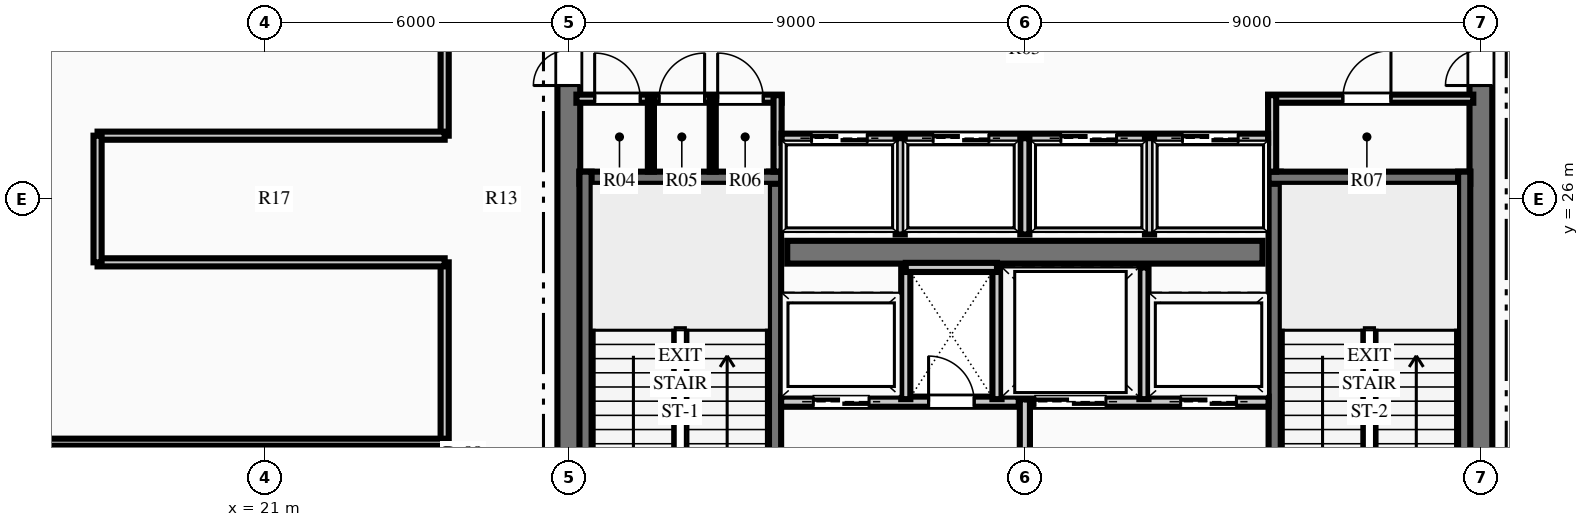
"""IFC4 building model, lengths in metres.
Left out: names, types, materials, properties, quantities, classifications, styles, units other than length and angle.
Written with IfcOpenShell. Run it as: python <this file> out.ifc"""

import sys

from ifc_helpers import new_model, si_unit, direction, frame, frame_2d, origin, place, context, subcontext, project, spatial, rectangle, extrude, element, fill, save


model = new_model("IFC4")
c1 = context("Model", 3, precision=1e-05, world=origin(), true_north=direction((0.0, 1.0)))
c2 = subcontext(c1, "Body", "Model", "MODEL_VIEW")
j1 = project(units=[si_unit("LENGTHUNIT", "METRE"), si_unit("PLANEANGLEUNIT", "RADIAN")], contexts=[c1])
p1 = place(None, origin())
s1 = spatial("IfcSite", under=j1, at=p1, CompositionType="ELEMENT")
p2 = place(p1, origin())
s2 = spatial("IfcBuilding", under=s1, at=p2, CompositionType="ELEMENT")
p3 = place(p2, frame((0.0, 0.0, 347.7)))
s3 = spatial("IfcBuildingStorey", under=s2, at=p3, CompositionType="ELEMENT", Elevation=347.7)
p4 = place(p3, frame((27.0, 18.225, 0.0), z_axis=(0.0, 0.0, 1.0), x_axis=(0.0, 1.0, 0.0)))
e1 = element("IfcWall", 1, at=p4, inside=s3, PredefinedType="SHEAR", context=c2, shape_type="SweptSolid", body=[
    extrude(rectangle(XDim=15.55, YDim=0.45, at=frame_2d((7.775, 0.0))), origin(), (0.0, 0.0, 1.0), 4.5),
])
p5 = place(p4, frame((10.015, 0.0, 0.0)))
e2 = element("IfcOpeningElement", 2, at=p5, cuts=e1, PredefinedType="OPENING", context=c2, shape_type="SweptSolid", body=[
    extrude(rectangle(XDim=1.4, YDim=2.2, at=frame_2d((0.7, 1.1))), frame((0.0, 0.235, 0.0), z_axis=(0.0, -1.0, 0.0), x_axis=(1.0, 0.0, 0.0)), (0.0, 0.0, 1.0), 0.47),
])
p6 = place(p3, frame((45.0, 18.225, 0.0), z_axis=(0.0, 0.0, 1.0), x_axis=(0.0, 1.0, 0.0)))
e3 = element("IfcWall", 3, at=p6, inside=s3, PredefinedType="SHEAR", context=c2, shape_type="SweptSolid", body=[
    extrude(rectangle(XDim=15.55, YDim=0.45, at=frame_2d((7.775, 0.0))), origin(), (0.0, 0.0, 1.0), 4.5),
])
p7 = place(p6, frame((10.015, 0.0, 0.0)))
e4 = element("IfcOpeningElement", 4, at=p7, cuts=e3, PredefinedType="OPENING", context=c2, shape_type="SweptSolid", body=[
    extrude(rectangle(XDim=1.4, YDim=2.2, at=frame_2d((0.7, 1.1))), frame((0.0, 0.235, 0.0), z_axis=(0.0, -1.0, 0.0), x_axis=(1.0, 0.0, 0.0)), (0.0, 0.0, 1.0), 0.47),
])
p8 = place(p3, frame((31.31, 24.95, 0.0), z_axis=(0.0, 0.0, 1.0), x_axis=(1.0, 0.0, 0.0)))
e5 = element("IfcWall", 5, at=p8, inside=s3, PredefinedType="SHEAR", context=c2, shape_type="SweptSolid", body=[
    extrude(rectangle(XDim=9.38, YDim=0.45, at=frame_2d((4.69, 0.0))), origin(), (0.0, 0.0, 1.0), 4.5),
])
p9 = place(p3, frame((31.07, 18.28, 0.0), z_axis=(0.0, 0.0, 1.0), x_axis=(0.0, 1.0, 0.0)))
e6 = element("IfcWall", 6, at=p9, inside=s3, PredefinedType="SHEAR", context=c2, shape_type="SweptSolid", body=[
    extrude(rectangle(XDim=8.26, YDim=0.24, at=frame_2d((4.13, 0.0))), origin(), (0.0, 0.0, 1.0), 4.5),
])
p10 = place(p9, frame((0.365, 0.0, 0.0)))
e7 = element("IfcOpeningElement", 7, at=p10, cuts=e6, PredefinedType="OPENING", context=c2, shape_type="SweptSolid", body=[
    extrude(rectangle(XDim=1.05, YDim=2.15, at=frame_2d((0.525, 1.075))), frame((0.0, 0.13, 0.0), z_axis=(0.0, -1.0, 0.0), x_axis=(1.0, 0.0, 0.0)), (0.0, 0.0, 1.0), 0.26),
])
p11 = place(p3, frame((27.21, 26.42, 0.0), z_axis=(0.0, 0.0, 1.0), x_axis=(1.0, 0.0, 0.0)))
e8 = element("IfcWall", 8, at=p11, inside=s3, PredefinedType="SHEAR", context=c2, shape_type="SweptSolid", body=[
    extrude(rectangle(XDim=3.98, YDim=0.24, at=frame_2d((1.99, 0.0))), origin(), (0.0, 0.0, 1.0), 4.5),
])
p12 = place(p3, frame((27.33, 18.28, 0.0), z_axis=(0.0, 0.0, 1.0), x_axis=(0.0, 1.0, 0.0)))
e9 = element("IfcWall", 9, at=p12, inside=s3, PredefinedType="SHEAR", context=c2, shape_type="SweptSolid", body=[
    extrude(rectangle(XDim=8.26, YDim=0.24, at=frame_2d((4.13, 0.0))), origin(), (0.0, 0.0, 1.0), 4.5),
])
p13 = place(p3, frame((40.93, 18.28, 0.0), z_axis=(0.0, 0.0, 1.0), x_axis=(0.0, 1.0, 0.0)))
e10 = element("IfcWall", 10, at=p13, inside=s3, PredefinedType="SHEAR", context=c2, shape_type="SweptSolid", body=[
    extrude(rectangle(XDim=8.26, YDim=0.24, at=frame_2d((4.13, 0.0))), origin(), (0.0, 0.0, 1.0), 4.5),
])
p14 = place(p13, frame((0.365, 0.0, 0.0)))
e11 = element("IfcOpeningElement", 11, at=p14, cuts=e10, PredefinedType="OPENING", context=c2, shape_type="SweptSolid", body=[
    extrude(rectangle(XDim=1.05, YDim=2.15, at=frame_2d((0.525, 1.075))), frame((0.0, 0.13, 0.0), z_axis=(0.0, -1.0, 0.0), x_axis=(1.0, 0.0, 0.0)), (0.0, 0.0, 1.0), 0.26),
])
p15 = place(p3, frame((40.81, 26.42, 0.0), z_axis=(0.0, 0.0, 1.0), x_axis=(1.0, 0.0, 0.0)))
e12 = element("IfcWall", 12, at=p15, inside=s3, PredefinedType="SHEAR", context=c2, shape_type="SweptSolid", body=[
    extrude(rectangle(XDim=3.98, YDim=0.24, at=frame_2d((1.99, 0.0))), origin(), (0.0, 0.0, 1.0), 4.5),
])
p16 = place(p3, frame((44.67, 18.28, 0.0), z_axis=(0.0, 0.0, 1.0), x_axis=(0.0, 1.0, 0.0)))
e13 = element("IfcWall", 13, at=p16, inside=s3, PredefinedType="SHEAR", context=c2, shape_type="SweptSolid", body=[
    extrude(rectangle(XDim=8.26, YDim=0.24, at=frame_2d((4.13, 0.0))), origin(), (0.0, 0.0, 1.0), 4.5),
])
p17 = place(p3, frame((36.0, 18.28, 0.0), z_axis=(0.0, 0.0, 1.0), x_axis=(0.0, 1.0, 0.0)))
e14 = element("IfcWall", 14, at=p17, inside=s3, PredefinedType="PARTITIONING", context=c2, shape_type="SweptSolid", body=[
    extrude(rectangle(XDim=3.77, YDim=0.2, at=frame_2d((1.885, 0.0))), origin(), (0.0, 0.0, 1.0), 4.1),
])
p18 = place(p3, frame((31.19, 22.0, 0.0), z_axis=(0.0, 0.0, 1.0), x_axis=(1.0, 0.0, 0.0)))
e15 = element("IfcWall", 15, at=p18, inside=s3, PredefinedType="PARTITIONING", context=c2, shape_type="SweptSolid", body=[
    extrude(rectangle(XDim=4.69, YDim=0.2, at=frame_2d((2.345, 0.0))), origin(), (0.0, 0.0, 1.0), 4.1),
])
p19 = place(p18, frame((2.91, 0.0, 0.0)))
e16 = element("IfcOpeningElement", 16, at=p19, cuts=e15, PredefinedType="OPENING", context=c2, shape_type="SweptSolid", body=[
    extrude(rectangle(XDim=0.9, YDim=2.15, at=frame_2d((0.45, 1.075))), frame((0.0, 0.11, 0.0), z_axis=(0.0, -1.0, 0.0), x_axis=(1.0, 0.0, 0.0)), (0.0, 0.0, 1.0), 0.22),
])
p20 = place(p18, frame((0.635, 0.0, 0.0)))
e17 = element("IfcOpeningElement", 17, at=p20, cuts=e15, PredefinedType="OPENING", context=c2, shape_type="SweptSolid", body=[
    extrude(rectangle(XDim=1.1, YDim=2.15, at=frame_2d((0.55, 1.075))), frame((0.0, 0.11, 0.0), z_axis=(0.0, -1.0, 0.0), x_axis=(1.0, 0.0, 0.0)), (0.0, 0.0, 1.0), 0.22),
])
p21 = place(p3, frame((36.12, 22.0, 0.0), z_axis=(0.0, 0.0, 1.0), x_axis=(1.0, 0.0, 0.0)))
e18 = element("IfcWall", 18, at=p21, inside=s3, PredefinedType="PARTITIONING", context=c2, shape_type="SweptSolid", body=[
    extrude(rectangle(XDim=4.69, YDim=0.2, at=frame_2d((2.345, 0.0))), origin(), (0.0, 0.0, 1.0), 4.1),
])
p22 = place(p21, frame((2.955, 0.0, 0.0)))
e19 = element("IfcOpeningElement", 19, at=p22, cuts=e18, PredefinedType="OPENING", context=c2, shape_type="SweptSolid", body=[
    extrude(rectangle(XDim=1.1, YDim=2.15, at=frame_2d((0.55, 1.075))), frame((0.0, 0.11, 0.0), z_axis=(0.0, -1.0, 0.0), x_axis=(1.0, 0.0, 0.0)), (0.0, 0.0, 1.0), 0.22),
])
p23 = place(p21, frame((0.08, 0.0, 0.0)))
e20 = element("IfcOpeningElement", 20, at=p23, cuts=e18, PredefinedType="OPENING", context=c2, shape_type="SweptSolid", body=[
    extrude(rectangle(XDim=1.4, YDim=2.2, at=frame_2d((0.7, 1.1))), frame((0.0, 0.11, 0.0), z_axis=(0.0, -1.0, 0.0), x_axis=(1.0, 0.0, 0.0)), (0.0, 0.0, 1.0), 0.22),
])
for number, where, z_axis, x_axis in (
    (21, (33.65, 22.05, 0.0), (0.0, 0.0, 1.0), (0.0, 1.0, 0.0)),
    (22, (35.45, 22.05, 0.0), (0.0, 0.0, 1.0), (0.0, 1.0, 0.0)),
):
    element("IfcWall", number, at=place(p3, frame(where, z_axis=z_axis, x_axis=x_axis)), inside=s3, PredefinedType="PARTITIONING", context=c2, shape_type="SweptSolid", body=[
        extrude(rectangle(XDim=2.6, YDim=0.18, at=frame_2d((1.3, 0.0))), origin(), (0.0, 0.0, 1.0), 4.1),
    ])
p24 = place(p3, frame((33.65, 24.65, 0.0), z_axis=(0.0, 0.0, 1.0), x_axis=(1.0, 0.0, 0.0)))
e23 = element("IfcWall", 23, at=p24, inside=s3, PredefinedType="PARTITIONING", context=c2, shape_type="SweptSolid", body=[
    extrude(rectangle(XDim=1.8, YDim=0.18, at=frame_2d((0.9, 0.0))), origin(), (0.0, 0.0, 1.0), 4.1),
])
p25 = place(p3, frame((38.35, 22.05, 0.0), z_axis=(0.0, 0.0, 1.0), x_axis=(0.0, 1.0, 0.0)))
e24 = element("IfcWall", 24, at=p25, inside=s3, PredefinedType="PARTITIONING", context=c2, shape_type="SweptSolid", body=[
    extrude(rectangle(XDim=2.6, YDim=0.18, at=frame_2d((1.3, 0.0))), origin(), (0.0, 0.0, 1.0), 4.1),
])
p26 = place(p3, frame((27.15, 27.98, 0.0), z_axis=(0.0, 0.0, 1.0), x_axis=(1.0, 0.0, 0.0)))
e25 = element("IfcWall", 25, at=p26, inside=s3, PredefinedType="PARTITIONING", context=c2, shape_type="SweptSolid", body=[
    extrude(rectangle(XDim=4.05, YDim=0.16, at=frame_2d((2.025, 0.0))), origin(), (0.0, 0.0, 1.0), 4.1),
])
p27 = place(p26, frame((0.36, 0.0, 0.0)))
e26 = element("IfcOpeningElement", 26, at=p27, cuts=e25, PredefinedType="OPENING", context=c2, shape_type="SweptSolid", body=[
    extrude(rectangle(XDim=0.9, YDim=2.15, at=frame_2d((0.45, 1.075))), frame((0.0, 0.09, 0.0), z_axis=(0.0, -1.0, 0.0), x_axis=(1.0, 0.0, 0.0)), (0.0, 0.0, 1.0), 0.18),
])
p28 = place(p26, frame((1.63, 0.0, 0.0)))
e27 = element("IfcOpeningElement", 27, at=p28, cuts=e25, PredefinedType="OPENING", context=c2, shape_type="SweptSolid", body=[
    extrude(rectangle(XDim=0.9, YDim=2.15, at=frame_2d((0.45, 1.075))), frame((0.0, 0.09, 0.0), z_axis=(0.0, -1.0, 0.0), x_axis=(1.0, 0.0, 0.0)), (0.0, 0.0, 1.0), 0.18),
])
p29 = place(p26, frame((2.788, 0.0, 0.0)))
e28 = element("IfcOpeningElement", 28, at=p29, cuts=e25, PredefinedType="OPENING", context=c2, shape_type="SweptSolid", body=[
    extrude(rectangle(XDim=0.9, YDim=2.15, at=frame_2d((0.45, 1.075))), frame((0.0, 0.09, 0.0), z_axis=(0.0, -1.0, 0.0), x_axis=(1.0, 0.0, 0.0)), (0.0, 0.0, 1.0), 0.18),
])
p30 = place(p3, frame((31.12, 26.54, 0.0), z_axis=(0.0, 0.0, 1.0), x_axis=(0.0, 1.0, 0.0)))
e29 = element("IfcWall", 29, at=p30, inside=s3, PredefinedType="PARTITIONING", context=c2, shape_type="SweptSolid", body=[
    extrude(rectangle(XDim=1.51, YDim=0.16, at=frame_2d((0.755, 0.0))), origin(), (0.0, 0.0, 1.0), 4.1),
])
p31 = place(p3, frame((40.8, 27.98, 0.0), z_axis=(0.0, 0.0, 1.0), x_axis=(1.0, 0.0, 0.0)))
e30 = element("IfcWall", 30, at=p31, inside=s3, PredefinedType="PARTITIONING", context=c2, shape_type="SweptSolid", body=[
    extrude(rectangle(XDim=4.05, YDim=0.16, at=frame_2d((2.025, 0.0))), origin(), (0.0, 0.0, 1.0), 4.1),
])
p32 = place(p31, frame((1.475, 0.0, 0.0)))
e31 = element("IfcOpeningElement", 31, at=p32, cuts=e30, PredefinedType="OPENING", context=c2, shape_type="SweptSolid", body=[
    extrude(rectangle(XDim=0.95, YDim=2.15, at=frame_2d((0.475, 1.075))), frame((0.0, 0.09, 0.0), z_axis=(0.0, -1.0, 0.0), x_axis=(1.0, 0.0, 0.0)), (0.0, 0.0, 1.0), 0.18),
])
p33 = place(p3, frame((40.88, 26.54, 0.0), z_axis=(0.0, 0.0, 1.0), x_axis=(0.0, 1.0, 0.0)))
e32 = element("IfcWall", 32, at=p33, inside=s3, PredefinedType="PARTITIONING", context=c2, shape_type="SweptSolid", body=[
    extrude(rectangle(XDim=1.51, YDim=0.16, at=frame_2d((0.755, 0.0))), origin(), (0.0, 0.0, 1.0), 4.1),
])
for number, where, z_axis, x_axis in (
    (33, (28.62, 26.54, 0.0), (0.0, 0.0, 1.0), (0.0, 1.0, 0.0)),
    (34, (29.84, 26.54, 0.0), (0.0, 0.0, 1.0), (0.0, 1.0, 0.0)),
):
    element("IfcWall", number, at=place(p3, frame(where, z_axis=z_axis, x_axis=x_axis)), inside=s3, PredefinedType="PARTITIONING", context=c2, shape_type="SweptSolid", body=[
        extrude(rectangle(XDim=1.44, YDim=0.12, at=frame_2d((0.72, 0.0))), origin(), (0.0, 0.0, 1.0), 4.1),
    ])
p34 = place(p3, frame((31.2, 27.2, 0.0), z_axis=(0.0, 0.0, 1.0), x_axis=(1.0, 0.0, 0.0)))
e35 = element("IfcWall", 35, at=p34, inside=s3, PredefinedType="PARTITIONING", context=c2, shape_type="SweptSolid", body=[
    extrude(rectangle(XDim=9.6, YDim=0.18, at=frame_2d((4.8, 0.0))), origin(), (0.0, 0.0, 1.0), 4.1),
])
p35 = place(p34, frame((0.59, 0.0, 0.0)))
e36 = element("IfcOpeningElement", 36, at=p35, cuts=e35, PredefinedType="OPENING", context=c2, shape_type="SweptSolid", body=[
    extrude(rectangle(XDim=1.1, YDim=2.15, at=frame_2d((0.55, 1.075))), frame((0.0, 0.1, 0.0), z_axis=(0.0, -1.0, 0.0), x_axis=(1.0, 0.0, 0.0)), (0.0, 0.0, 1.0), 0.2),
])
p36 = place(p34, frame((2.99, 0.0, 0.0)))
e37 = element("IfcOpeningElement", 37, at=p36, cuts=e35, PredefinedType="OPENING", context=c2, shape_type="SweptSolid", body=[
    extrude(rectangle(XDim=1.1, YDim=2.15, at=frame_2d((0.55, 1.075))), frame((0.0, 0.1, 0.0), z_axis=(0.0, -1.0, 0.0), x_axis=(1.0, 0.0, 0.0)), (0.0, 0.0, 1.0), 0.2),
])
p37 = place(p34, frame((5.51, 0.0, 0.0)))
e38 = element("IfcOpeningElement", 38, at=p37, cuts=e35, PredefinedType="OPENING", context=c2, shape_type="SweptSolid", body=[
    extrude(rectangle(XDim=1.1, YDim=2.15, at=frame_2d((0.55, 1.075))), frame((0.0, 0.1, 0.0), z_axis=(0.0, -1.0, 0.0), x_axis=(1.0, 0.0, 0.0)), (0.0, 0.0, 1.0), 0.2),
])
p38 = place(p34, frame((7.91, 0.0, 0.0)))
e39 = element("IfcOpeningElement", 39, at=p38, cuts=e35, PredefinedType="OPENING", context=c2, shape_type="SweptSolid", body=[
    extrude(rectangle(XDim=1.1, YDim=2.15, at=frame_2d((0.55, 1.075))), frame((0.0, 0.1, 0.0), z_axis=(0.0, -1.0, 0.0), x_axis=(1.0, 0.0, 0.0)), (0.0, 0.0, 1.0), 0.2),
])
for number, where, z_axis, x_axis in (
    (40, (33.54, 25.3, 0.0), (0.0, 0.0, 1.0), (0.0, 1.0, 0.0)),
    (41, (36.0, 25.3, 0.0), (0.0, 0.0, 1.0), (0.0, 1.0, 0.0)),
    (42, (38.46, 25.3, 0.0), (0.0, 0.0, 1.0), (0.0, 1.0, 0.0)),
):
    element("IfcWall", number, at=place(p3, frame(where, z_axis=z_axis, x_axis=x_axis)), inside=s3, PredefinedType="PARTITIONING", context=c2, shape_type="SweptSolid", body=[
        extrude(rectangle(XDim=1.9, YDim=0.18, at=frame_2d((0.95, 0.0))), origin(), (0.0, 0.0, 1.0), 4.1),
    ])
p39 = place(p3, frame((24.55, 15.55, 0.0), z_axis=(0.0, 0.0, 1.0), x_axis=(0.0, 1.0, 0.0)))
e43 = element("IfcWall", 43, at=p39, inside=s3, PredefinedType="PARTITIONING", context=c2, shape_type="SweptSolid", body=[
    extrude(rectangle(XDim=9.2, YDim=0.16, at=frame_2d((4.6, 0.0))), origin(), (0.0, 0.0, 1.0), 4.1),
])
p40 = place(p39, frame((3.543, 0.0, 0.0)))
e44 = element("IfcOpeningElement", 44, at=p40, cuts=e43, PredefinedType="OPENING", context=c2, shape_type="SweptSolid", body=[
    extrude(rectangle(XDim=1.05, YDim=2.15, at=frame_2d((0.525, 1.075))), frame((0.0, 0.09, 0.0), z_axis=(0.0, -1.0, 0.0), x_axis=(1.0, 0.0, 0.0)), (0.0, 0.0, 1.0), 0.18),
])
p41 = place(p3, frame((24.55, 27.25, 0.0), z_axis=(0.0, 0.0, 1.0), x_axis=(0.0, 1.0, 0.0)))
e45 = element("IfcWall", 45, at=p41, inside=s3, PredefinedType="PARTITIONING", context=c2, shape_type="SweptSolid", body=[
    extrude(rectangle(XDim=9.2, YDim=0.16, at=frame_2d((4.6, 0.0))), origin(), (0.0, 0.0, 1.0), 4.1),
])
p42 = place(p41, frame((4.075, 0.0, 0.0)))
e46 = element("IfcOpeningElement", 46, at=p42, cuts=e45, PredefinedType="OPENING", context=c2, shape_type="SweptSolid", body=[
    extrude(rectangle(XDim=1.05, YDim=2.15, at=frame_2d((0.525, 1.075))), frame((0.0, 0.09, 0.0), z_axis=(0.0, -1.0, 0.0), x_axis=(1.0, 0.0, 0.0)), (0.0, 0.0, 1.0), 0.18),
])
for number, where, z_axis, x_axis in (
    (47, (17.7, 24.75, 0.0), (0.0, 0.0, 1.0), (1.0, 0.0, 0.0)),
    (48, (17.7, 27.25, 0.0), (0.0, 0.0, 1.0), (1.0, 0.0, 0.0)),
):
    element("IfcWall", number, at=place(p3, frame(where, z_axis=z_axis, x_axis=x_axis)), inside=s3, PredefinedType="PARTITIONING", context=c2, shape_type="SweptSolid", body=[
        extrude(rectangle(XDim=6.85, YDim=0.16, at=frame_2d((3.425, 0.0))), origin(), (0.0, 0.0, 1.0), 4.1),
    ])
p43 = place(p3, frame((17.7, 24.75, 0.0), z_axis=(0.0, 0.0, 1.0), x_axis=(0.0, 1.0, 0.0)))
e49 = element("IfcWall", 49, at=p43, inside=s3, PredefinedType="PARTITIONING", context=c2, shape_type="SweptSolid", body=[
    extrude(rectangle(XDim=2.5, YDim=0.16, at=frame_2d((1.25, 0.0))), origin(), (0.0, 0.0, 1.0), 4.1),
])
p44 = place(p3, frame((14.448, 21.2, 0.0), z_axis=(0.0, 0.0, 1.0), x_axis=(1.0, 0.0, 0.0)))
e50 = element("IfcWall", 50, at=p44, inside=s3, PredefinedType="PARTITIONING", context=c2, shape_type="SweptSolid", body=[
    extrude(rectangle(XDim=10.102, YDim=0.14, at=frame_2d((5.051, 0.0))), origin(), (0.0, 0.0, 1.0), 4.1),
])
p45 = place(p27, origin())
e51 = element("IfcDoor", 51, at=p45, inside=s3, OperationType="SINGLE_SWING_LEFT", PredefinedType="DOOR", context=c2, shape_type="SweptSolid", body=[
    extrude(rectangle(XDim=0.9, YDim=2.15, at=frame_2d((0.45, 1.075))), frame((0.0, 0.025, 0.0), z_axis=(0.0, -1.0, 0.0), x_axis=(1.0, 0.0, 0.0)), (0.0, 0.0, 1.0), 0.05),
])
fill(e26, e51)
p46 = place(p28, origin())
e52 = element("IfcDoor", 52, at=p46, inside=s3, OperationType="SINGLE_SWING_RIGHT", PredefinedType="DOOR", context=c2, shape_type="SweptSolid", body=[
    extrude(rectangle(XDim=0.9, YDim=2.15, at=frame_2d((0.45, 1.075))), frame((0.0, 0.025, 0.0), z_axis=(0.0, -1.0, 0.0), x_axis=(1.0, 0.0, 0.0)), (0.0, 0.0, 1.0), 0.05),
])
fill(e27, e52)
p47 = place(p29, origin())
e53 = element("IfcDoor", 53, at=p47, inside=s3, OperationType="SINGLE_SWING_LEFT", PredefinedType="DOOR", context=c2, shape_type="SweptSolid", body=[
    extrude(rectangle(XDim=0.9, YDim=2.15, at=frame_2d((0.45, 1.075))), frame((0.0, 0.025, 0.0), z_axis=(0.0, -1.0, 0.0), x_axis=(1.0, 0.0, 0.0)), (0.0, 0.0, 1.0), 0.05),
])
fill(e28, e53)
p48 = place(p32, origin())
e54 = element("IfcDoor", 54, at=p48, inside=s3, OperationType="SINGLE_SWING_RIGHT", PredefinedType="DOOR", context=c2, shape_type="SweptSolid", body=[
    extrude(rectangle(XDim=0.95, YDim=2.15, at=frame_2d((0.475, 1.075))), frame((0.0, 0.025, 0.0), z_axis=(0.0, -1.0, 0.0), x_axis=(1.0, 0.0, 0.0)), (0.0, 0.0, 1.0), 0.05),
])
fill(e31, e54)
p49 = place(p19, origin())
e55 = element("IfcDoor", 55, at=p49, inside=s3, OperationType="SINGLE_SWING_LEFT", PredefinedType="DOOR", context=c2, shape_type="SweptSolid", body=[
    extrude(rectangle(XDim=0.9, YDim=2.15, at=frame_2d((0.45, 1.075))), frame((0.0, 0.025, 0.0), z_axis=(0.0, -1.0, 0.0), x_axis=(1.0, 0.0, 0.0)), (0.0, 0.0, 1.0), 0.05),
])
fill(e16, e55)
p50 = place(p5, origin())
e56 = element("IfcDoor", 56, at=p50, inside=s3, OperationType="DOUBLE_DOOR_SINGLE_SWING", PredefinedType="DOOR", context=c2, shape_type="SweptSolid", body=[
    extrude(rectangle(XDim=1.4, YDim=2.2, at=frame_2d((0.7, 1.1))), frame((0.0, 0.025, 0.0), z_axis=(0.0, -1.0, 0.0), x_axis=(1.0, 0.0, 0.0)), (0.0, 0.0, 1.0), 0.05),
])
fill(e2, e56)
p51 = place(p7, origin())
e57 = element("IfcDoor", 57, at=p51, inside=s3, OperationType="DOUBLE_DOOR_SINGLE_SWING", PredefinedType="DOOR", context=c2, shape_type="SweptSolid", body=[
    extrude(rectangle(XDim=1.4, YDim=2.2, at=frame_2d((0.7, 1.1))), frame((0.0, 0.025, 0.0), z_axis=(0.0, -1.0, 0.0), x_axis=(1.0, 0.0, 0.0)), (0.0, 0.0, 1.0), 0.05),
])
fill(e4, e57)
p52 = place(p35, origin())
e58 = element("IfcDoor", 58, at=p52, inside=s3, OperationType="SLIDING_TO_LEFT", PredefinedType="DOOR", context=c2, shape_type="SweptSolid", body=[
    extrude(rectangle(XDim=1.1, YDim=2.15, at=frame_2d((0.55, 1.075))), frame((0.0, 0.025, 0.0), z_axis=(0.0, -1.0, 0.0), x_axis=(1.0, 0.0, 0.0)), (0.0, 0.0, 1.0), 0.05),
])
fill(e36, e58)
p53 = place(p36, origin())
e59 = element("IfcDoor", 59, at=p53, inside=s3, OperationType="SLIDING_TO_LEFT", PredefinedType="DOOR", context=c2, shape_type="SweptSolid", body=[
    extrude(rectangle(XDim=1.1, YDim=2.15, at=frame_2d((0.55, 1.075))), frame((0.0, 0.025, 0.0), z_axis=(0.0, -1.0, 0.0), x_axis=(1.0, 0.0, 0.0)), (0.0, 0.0, 1.0), 0.05),
])
fill(e37, e59)
p54 = place(p37, origin())
e60 = element("IfcDoor", 60, at=p54, inside=s3, OperationType="SLIDING_TO_LEFT", PredefinedType="DOOR", context=c2, shape_type="SweptSolid", body=[
    extrude(rectangle(XDim=1.1, YDim=2.15, at=frame_2d((0.55, 1.075))), frame((0.0, 0.025, 0.0), z_axis=(0.0, -1.0, 0.0), x_axis=(1.0, 0.0, 0.0)), (0.0, 0.0, 1.0), 0.05),
])
fill(e38, e60)
p55 = place(p38, origin())
e61 = element("IfcDoor", 61, at=p55, inside=s3, OperationType="SLIDING_TO_LEFT", PredefinedType="DOOR", context=c2, shape_type="SweptSolid", body=[
    extrude(rectangle(XDim=1.1, YDim=2.15, at=frame_2d((0.55, 1.075))), frame((0.0, 0.025, 0.0), z_axis=(0.0, -1.0, 0.0), x_axis=(1.0, 0.0, 0.0)), (0.0, 0.0, 1.0), 0.05),
])
fill(e39, e61)
p56 = place(p20, origin())
e62 = element("IfcDoor", 62, at=p56, inside=s3, OperationType="SLIDING_TO_LEFT", PredefinedType="DOOR", context=c2, shape_type="SweptSolid", body=[
    extrude(rectangle(XDim=1.1, YDim=2.15, at=frame_2d((0.55, 1.075))), frame((0.0, 0.025, 0.0), z_axis=(0.0, -1.0, 0.0), x_axis=(1.0, 0.0, 0.0)), (0.0, 0.0, 1.0), 0.05),
])
fill(e17, e62)
p57 = place(p22, origin())
e63 = element("IfcDoor", 63, at=p57, inside=s3, OperationType="SLIDING_TO_LEFT", PredefinedType="DOOR", context=c2, shape_type="SweptSolid", body=[
    extrude(rectangle(XDim=1.1, YDim=2.15, at=frame_2d((0.55, 1.075))), frame((0.0, 0.025, 0.0), z_axis=(0.0, -1.0, 0.0), x_axis=(1.0, 0.0, 0.0)), (0.0, 0.0, 1.0), 0.05),
])
fill(e19, e63)
p58 = place(p23, origin())
e64 = element("IfcDoor", 64, at=p58, inside=s3, OperationType="SLIDING_TO_LEFT", PredefinedType="DOOR", context=c2, shape_type="SweptSolid", body=[
    extrude(rectangle(XDim=1.4, YDim=2.2, at=frame_2d((0.7, 1.1))), frame((0.0, 0.025, 0.0), z_axis=(0.0, -1.0, 0.0), x_axis=(1.0, 0.0, 0.0)), (0.0, 0.0, 1.0), 0.05),
])
fill(e20, e64)
save(model, sys.argv[1])
